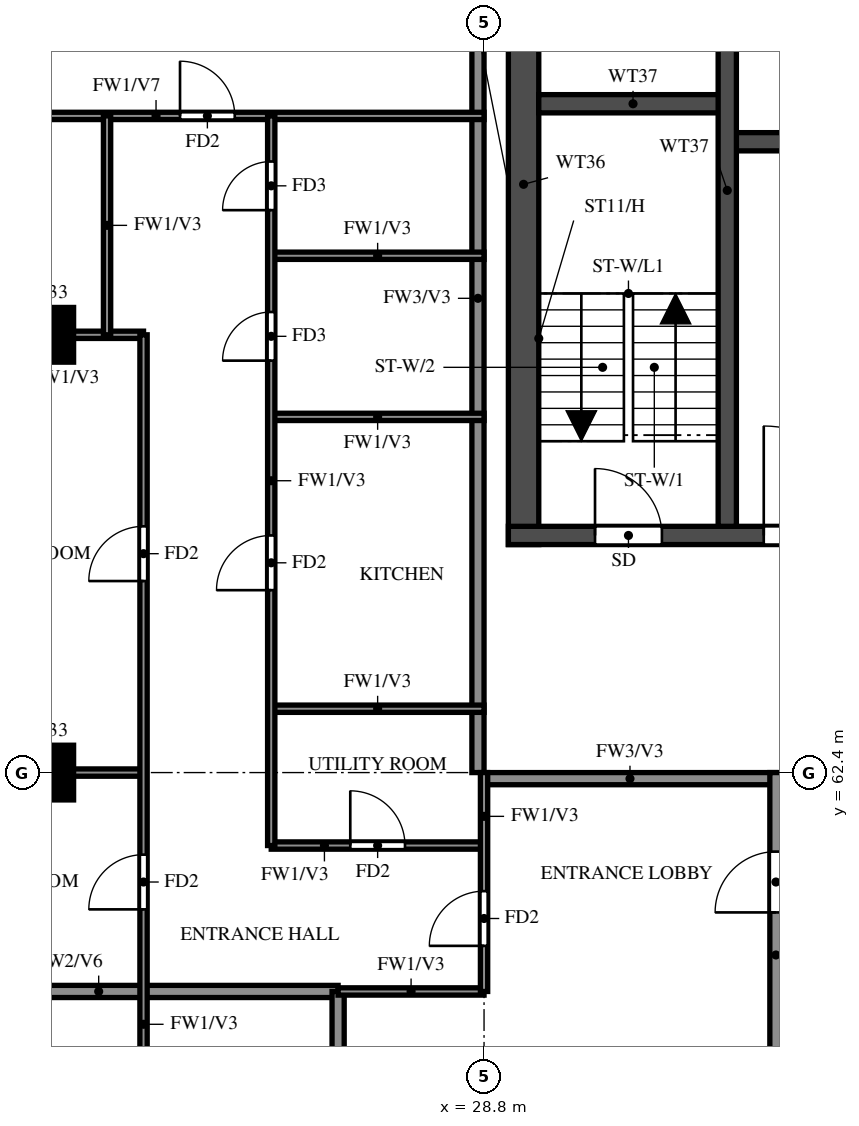
"""IFC4 building model, lengths in metres.
Left out: names, types, materials, properties, quantities, classifications, styles, units other than length and angle.
Written with IfcOpenShell. Run it as: python <this file> out.ifc"""

import sys

from ifc_helpers import new_model, si_unit, direction, frame, frame_2d, origin, origin_2d, place, context, subcontext, project, spatial, rectangle, extrude, source, transform, mapped, element, fill, save


model = new_model("IFC4")
c1 = context("Model", 3, precision=1e-05, world=origin(), true_north=direction((0.0, 1.0)))
c2 = subcontext(c1, "Body", "Model", "MODEL_VIEW")
j1 = project(units=[si_unit("LENGTHUNIT", "METRE"), si_unit("PLANEANGLEUNIT", "RADIAN")], contexts=[c1])
p1 = place(None, origin())
s1 = spatial("IfcSite", under=j1, at=p1, CompositionType="ELEMENT")
p2 = place(p1, origin())
s2 = spatial("IfcBuilding", under=s1, at=p2, CompositionType="ELEMENT")
p3 = place(p2, frame((0.0, 0.0, 215.0)))
s3 = spatial("IfcBuildingStorey", under=s2, at=p3, CompositionType="ELEMENT", Elevation=215.0)
m1 = source(origin(), c2, "Body", "SweptSolid", [
    extrude(rectangle(XDim=0.9, YDim=0.9, at=origin_2d()), origin(), (0.0, 0.0, 1.0), 3.22),
])
for number, where, z_axis, x_axis in (
    (1, (21.6, 62.4, 0.0), (0.0, 0.0, 1.0), (1.0, 0.0, 0.0)),
    (2, (21.6, 69.6, 0.0), (0.0, 0.0, 1.0), (1.0, 0.0, 0.0)),
):
    element("IfcColumn", number, at=place(p3, frame(where, z_axis=z_axis, x_axis=x_axis)), inside=s3, PredefinedType="COLUMN", context=c2, shape_type="MappedRepresentation", body=[
        mapped(m1, transform((0.0, 0.0, 0.0))),
    ])
p4 = place(p3, frame((29.45, 66.15, 0.0), z_axis=(0.0, 0.0, 1.0), x_axis=(0.0, 1.0, 0.0)))
e3 = element("IfcWall", 3, at=p4, inside=s3, PredefinedType="SHEAR", context=c2, shape_type="SweptSolid", body=[
    extrude(rectangle(XDim=11.85, YDim=0.5, at=frame_2d((5.925, 0.0))), origin(), (0.0, 0.0, 1.0), 3.22),
])
p5 = place(p3, frame((29.2, 66.3, 0.0), z_axis=(0.0, 0.0, 1.0), x_axis=(1.0, 0.0, 0.0)))
e4 = element("IfcWall", 4, at=p5, inside=s3, PredefinedType="SHEAR", context=c2, shape_type="SweptSolid", body=[
    extrude(rectangle(XDim=42.4, YDim=0.3, at=frame_2d((21.2, 0.0))), origin(), (0.0, 0.0, 1.0), 3.22),
])
p6 = place(p5, frame((1.425, 0.0, 0.0)))
e5 = element("IfcOpeningElement", 5, at=p6, cuts=e4, PredefinedType="OPENING", context=c2, shape_type="SweptSolid", body=[
    extrude(rectangle(XDim=1.1, YDim=2.1, at=frame_2d((0.55, 1.05))), frame((0.0, 0.16, 0.0), z_axis=(0.0, -1.0, 0.0), x_axis=(1.0, 0.0, 0.0)), (0.0, 0.0, 1.0), 0.32),
])
p7 = place(p5, frame((4.2, 0.0, 0.0)))
e6 = element("IfcOpeningElement", 6, at=p7, cuts=e4, PredefinedType="OPENING", context=c2, shape_type="SweptSolid", body=[
    extrude(rectangle(XDim=1.8, YDim=2.1, at=frame_2d((0.9, 1.05))), frame((0.0, 0.16, 0.0), z_axis=(0.0, -1.0, 0.0), x_axis=(1.0, 0.0, 0.0)), (0.0, 0.0, 1.0), 0.32),
])
p8 = place(p3, frame((32.8, 72.775, 0.0), z_axis=(0.0, 0.0, 1.0), x_axis=(1.0, 0.0, 0.0)))
e7 = element("IfcWall", 7, at=p8, inside=s3, PredefinedType="SHEAR", context=c2, shape_type="SweptSolid", body=[
    extrude(rectangle(XDim=35.2, YDim=0.3, at=frame_2d((17.6, 0.0))), origin(), (0.0, 0.0, 1.0), 3.22),
])
p9 = place(p8, frame((19.8, 0.0, 0.0)))
e8 = element("IfcOpeningElement", 8, at=p9, cuts=e7, PredefinedType="OPENING", context=c2, shape_type="SweptSolid", body=[
    extrude(rectangle(XDim=1.1, YDim=2.1, at=frame_2d((0.55, 1.05))), frame((0.0, 0.16, 0.0), z_axis=(0.0, -1.0, 0.0), x_axis=(1.0, 0.0, 0.0)), (0.0, 0.0, 1.0), 0.32),
])
p10 = place(p8, frame((27.725, 0.0, 0.0)))
e9 = element("IfcOpeningElement", 9, at=p10, cuts=e7, PredefinedType="OPENING", context=c2, shape_type="SweptSolid", body=[
    extrude(rectangle(XDim=1.1, YDim=2.1, at=frame_2d((0.55, 1.05))), frame((0.0, 0.16, 0.0), z_axis=(0.0, -1.0, 0.0), x_axis=(1.0, 0.0, 0.0)), (0.0, 0.0, 1.0), 0.32),
])
p11 = place(p8, frame((30.325, 0.0, 0.0)))
e10 = element("IfcOpeningElement", 10, at=p11, cuts=e7, PredefinedType="OPENING", context=c2, shape_type="SweptSolid", body=[
    extrude(rectangle(XDim=1.1, YDim=2.1, at=frame_2d((0.55, 1.05))), frame((0.0, 0.16, 0.0), z_axis=(0.0, -1.0, 0.0), x_axis=(1.0, 0.0, 0.0)), (0.0, 0.0, 1.0), 0.32),
])
p12 = place(p8, frame((3.825, 0.0, 0.0)))
e11 = element("IfcOpeningElement", 11, at=p12, cuts=e7, PredefinedType="OPENING", context=c2, shape_type="SweptSolid", body=[
    extrude(rectangle(XDim=1.1, YDim=2.1, at=frame_2d((0.55, 1.05))), frame((0.0, 0.16, 0.0), z_axis=(0.0, -1.0, 0.0), x_axis=(1.0, 0.0, 0.0)), (0.0, 0.0, 1.0), 0.32),
])
p13 = place(p8, frame((6.575, 0.0, 0.0)))
e12 = element("IfcOpeningElement", 12, at=p13, cuts=e7, PredefinedType="OPENING", context=c2, shape_type="SweptSolid", body=[
    extrude(rectangle(XDim=1.1, YDim=2.1, at=frame_2d((0.55, 1.05))), frame((0.0, 0.16, 0.0), z_axis=(0.0, -1.0, 0.0), x_axis=(1.0, 0.0, 0.0)), (0.0, 0.0, 1.0), 0.32),
])
p14 = place(p8, frame((9.325, 0.0, 0.0)))
e13 = element("IfcOpeningElement", 13, at=p14, cuts=e7, PredefinedType="OPENING", context=c2, shape_type="SweptSolid", body=[
    extrude(rectangle(XDim=1.1, YDim=2.1, at=frame_2d((0.55, 1.05))), frame((0.0, 0.16, 0.0), z_axis=(0.0, -1.0, 0.0), x_axis=(1.0, 0.0, 0.0)), (0.0, 0.0, 1.0), 0.32),
])
p15 = place(p8, frame((12.075, 0.0, 0.0)))
e14 = element("IfcOpeningElement", 14, at=p15, cuts=e7, PredefinedType="OPENING", context=c2, shape_type="SweptSolid", body=[
    extrude(rectangle(XDim=1.1, YDim=2.1, at=frame_2d((0.55, 1.05))), frame((0.0, 0.16, 0.0), z_axis=(0.0, -1.0, 0.0), x_axis=(1.0, 0.0, 0.0)), (0.0, 0.0, 1.0), 0.32),
])
p16 = place(p8, frame((14.825, 0.0, 0.0)))
e15 = element("IfcOpeningElement", 15, at=p16, cuts=e7, PredefinedType="OPENING", context=c2, shape_type="SweptSolid", body=[
    extrude(rectangle(XDim=1.1, YDim=2.1, at=frame_2d((0.55, 1.05))), frame((0.0, 0.16, 0.0), z_axis=(0.0, -1.0, 0.0), x_axis=(1.0, 0.0, 0.0)), (0.0, 0.0, 1.0), 0.32),
])
p17 = place(p8, frame((17.575, 0.0, 0.0)))
e16 = element("IfcOpeningElement", 16, at=p17, cuts=e7, PredefinedType="OPENING", context=c2, shape_type="SweptSolid", body=[
    extrude(rectangle(XDim=1.1, YDim=2.1, at=frame_2d((0.55, 1.05))), frame((0.0, 0.16, 0.0), z_axis=(0.0, -1.0, 0.0), x_axis=(1.0, 0.0, 0.0)), (0.0, 0.0, 1.0), 0.32),
])
p18 = place(p8, frame((0.95, 0.0, 0.0)))
e17 = element("IfcOpeningElement", 17, at=p18, cuts=e7, PredefinedType="OPENING", context=c2, shape_type="SweptSolid", body=[
    extrude(rectangle(XDim=1.1, YDim=2.1, at=frame_2d((0.55, 1.05))), frame((0.0, 0.16, 0.0), z_axis=(0.0, -1.0, 0.0), x_axis=(1.0, 0.0, 0.0)), (0.0, 0.0, 1.0), 0.32),
])
p19 = place(p3, frame((29.7, 73.4, 0.0), z_axis=(0.0, 0.0, 1.0), x_axis=(1.0, 0.0, 0.0)))
e18 = element("IfcWall", 18, at=p19, inside=s3, PredefinedType="SHEAR", context=c2, shape_type="SweptSolid", body=[
    extrude(rectangle(XDim=3.1, YDim=0.3, at=frame_2d((1.55, 0.0))), origin(), (0.0, 0.0, 1.0), 3.22),
])
p20 = place(p3, frame((32.8, 66.45, 0.0), z_axis=(0.0, 0.0, 1.0), x_axis=(0.0, 1.0, 0.0)))
e19 = element("IfcWall", 19, at=p20, inside=s3, PredefinedType="SHEAR", context=c2, shape_type="SweptSolid", body=[
    extrude(rectangle(XDim=11.05, YDim=0.3, at=frame_2d((5.525, 0.0))), origin(), (0.0, 0.0, 1.0), 3.22),
])
p21 = place(p3, frame((28.8, 62.3, 0.0), z_axis=(0.0, 0.0, 1.0), x_axis=(1.0, 0.0, 0.0)))
e20 = element("IfcWall", 20, at=p21, inside=s3, PredefinedType="SOLIDWALL", context=c2, shape_type="SweptSolid", body=[
    extrude(rectangle(XDim=4.8, YDim=0.2, at=frame_2d((2.4, 0.0))), origin(), (0.0, 0.0, 1.0), 3.22),
])
p22 = place(p3, frame((28.7, 62.4, 0.0), z_axis=(0.0, 0.0, 1.0), x_axis=(0.0, 1.0, 0.0)))
e21 = element("IfcWall", 21, at=p22, inside=s3, PredefinedType="SOLIDWALL", context=c2, shape_type="SweptSolid", body=[
    extrude(rectangle(XDim=15.6, YDim=0.2, at=frame_2d((7.8, 0.0))), origin(), (0.0, 0.0, 1.0), 3.22),
])
p23 = place(p3, frame((33.6, 56.4, 0.0), z_axis=(0.0, 0.0, 1.0), x_axis=(0.0, 1.0, 0.0)))
e22 = element("IfcWall", 22, at=p23, inside=s3, PredefinedType="SOLIDWALL", context=c2, shape_type="SweptSolid", body=[
    extrude(rectangle(XDim=6.0, YDim=0.2, at=frame_2d((3.0, 0.0))), origin(), (0.0, 0.0, 1.0), 3.22),
])
p24 = place(p23, frame((3.7, 0.0, 0.0)))
e23 = element("IfcOpeningElement", 23, at=p24, cuts=e22, PredefinedType="OPENING", context=c2, shape_type="SweptSolid", body=[
    extrude(rectangle(XDim=1.0, YDim=2.1, at=frame_2d((0.5, 1.05))), frame((0.0, 0.11, 0.0), z_axis=(0.0, -1.0, 0.0), x_axis=(1.0, 0.0, 0.0)), (0.0, 0.0, 1.0), 0.22),
])
p25 = place(p3, frame((18.525, 58.8, 0.0), z_axis=(0.0, 0.0, 1.0), x_axis=(1.0, 0.0, 0.0)))
e24 = element("IfcWall", 24, at=p25, inside=s3, PredefinedType="SOLIDWALL", context=c2, shape_type="SweptSolid", body=[
    extrude(rectangle(XDim=7.875, YDim=0.2, at=frame_2d((3.938, 0.0))), origin(), (0.0, 0.0, 1.0), 2.32),
])
p26 = place(p3, frame((26.4, 56.4, 0.0), z_axis=(0.0, 0.0, 1.0), x_axis=(0.0, 1.0, 0.0)))
e25 = element("IfcWall", 25, at=p26, inside=s3, PredefinedType="SOLIDWALL", context=c2, shape_type="SweptSolid", body=[
    extrude(rectangle(XDim=2.4, YDim=0.2, at=frame_2d((1.2, 0.0))), origin(), (0.0, 0.0, 1.0), 3.22),
])
p27 = place(p3, frame((26.4, 58.8, 0.0), z_axis=(0.0, 0.0, 1.0), x_axis=(1.0, 0.0, 0.0)))
e26 = element("IfcWall", 26, at=p27, inside=s3, PredefinedType="PARTITIONING", context=c2, shape_type="SweptSolid", body=[
    extrude(rectangle(XDim=2.4, YDim=0.12, at=frame_2d((1.2, 0.0))), origin(), (0.0, 0.0, 1.0), 3.22),
])
p28 = place(p3, frame((25.3, 61.2, 0.0), z_axis=(0.0, 0.0, 1.0), x_axis=(1.0, 0.0, 0.0)))
e27 = element("IfcWall", 27, at=p28, inside=s3, PredefinedType="PARTITIONING", context=c2, shape_type="SweptSolid", body=[
    extrude(rectangle(XDim=3.5, YDim=0.12, at=frame_2d((1.75, 0.0))), origin(), (0.0, 0.0, 1.0), 3.22),
])
p29 = place(p28, frame((1.3, 0.0, 0.0)))
e28 = element("IfcOpeningElement", 28, at=p29, cuts=e27, PredefinedType="OPENING", context=c2, shape_type="SweptSolid", body=[
    extrude(rectangle(XDim=0.9, YDim=2.1, at=frame_2d((0.45, 1.05))), frame((0.0, 0.07, 0.0), z_axis=(0.0, -1.0, 0.0), x_axis=(1.0, 0.0, 0.0)), (0.0, 0.0, 1.0), 0.14),
])
p30 = place(p3, frame((18.525, 62.4, 0.0), z_axis=(0.0, 0.0, 1.0), x_axis=(1.0, 0.0, 0.0)))
e29 = element("IfcWall", 29, at=p30, inside=s3, PredefinedType="PARTITIONING", context=c2, shape_type="SweptSolid", body=[
    extrude(rectangle(XDim=4.675, YDim=0.12, at=frame_2d((2.337, 0.0))), origin(), (0.0, 0.0, 1.0), 3.22),
])
for number, where, z_axis, x_axis in (
    (30, (25.3, 63.45, 0.0), (0.0, 0.0, 1.0), (1.0, 0.0, 0.0)),
    (31, (25.3, 68.25, 0.0), (0.0, 0.0, 1.0), (1.0, 0.0, 0.0)),
):
    element("IfcWall", number, at=place(p3, frame(where, z_axis=z_axis, x_axis=x_axis)), inside=s3, PredefinedType="PARTITIONING", context=c2, shape_type="SweptSolid", body=[
        extrude(rectangle(XDim=3.5, YDim=0.12, at=frame_2d((1.75, 0.0))), origin(), (0.0, 0.0, 1.0), 3.22),
    ])
p31 = place(p3, frame((18.525, 69.6, 0.0), z_axis=(0.0, 0.0, 1.0), x_axis=(1.0, 0.0, 0.0)))
e32 = element("IfcWall", 32, at=p31, inside=s3, PredefinedType="PARTITIONING", context=c2, shape_type="SweptSolid", body=[
    extrude(rectangle(XDim=4.675, YDim=0.12, at=frame_2d((2.337, 0.0))), origin(), (0.0, 0.0, 1.0), 3.22),
])
p32 = place(p31, frame((1.538, 0.0, 0.0)))
e33 = element("IfcOpeningElement", 33, at=p32, cuts=e32, PredefinedType="OPENING", context=c2, shape_type="SweptSolid", body=[
    extrude(rectangle(XDim=0.8, YDim=2.1, at=frame_2d((0.4, 1.05))), frame((0.0, 0.07, 0.0), z_axis=(0.0, -1.0, 0.0), x_axis=(1.0, 0.0, 0.0)), (0.0, 0.0, 1.0), 0.14),
])
p33 = place(p3, frame((25.3, 70.9, 0.0), z_axis=(0.0, 0.0, 1.0), x_axis=(1.0, 0.0, 0.0)))
e34 = element("IfcWall", 34, at=p33, inside=s3, PredefinedType="PARTITIONING", context=c2, shape_type="SweptSolid", body=[
    extrude(rectangle(XDim=3.5, YDim=0.12, at=frame_2d((1.75, 0.0))), origin(), (0.0, 0.0, 1.0), 3.22),
])
p34 = place(p3, frame((18.525, 73.2, 0.0), z_axis=(0.0, 0.0, 1.0), x_axis=(1.0, 0.0, 0.0)))
e35 = element("IfcWall", 35, at=p34, inside=s3, PredefinedType="PARTITIONING", context=c2, shape_type="SweptSolid", body=[
    extrude(rectangle(XDim=10.275, YDim=0.12, at=frame_2d((5.138, 0.0))), origin(), (0.0, 0.0, 1.0), 2.32),
])
p35 = place(p34, frame((5.275, 0.0, 0.0)))
e36 = element("IfcOpeningElement", 36, at=p35, cuts=e35, PredefinedType="OPENING", context=c2, shape_type="SweptSolid", body=[
    extrude(rectangle(XDim=0.9, YDim=2.1, at=frame_2d((0.45, 1.05))), frame((0.0, 0.07, 0.0), z_axis=(0.0, -1.0, 0.0), x_axis=(1.0, 0.0, 0.0)), (0.0, 0.0, 1.0), 0.14),
])
p36 = place(p3, frame((22.6, 69.6, 0.0), z_axis=(0.0, 0.0, 1.0), x_axis=(0.0, 1.0, 0.0)))
e37 = element("IfcWall", 37, at=p36, inside=s3, PredefinedType="PARTITIONING", context=c2, shape_type="SweptSolid", body=[
    extrude(rectangle(XDim=3.6, YDim=0.12, at=frame_2d((1.8, 0.0))), origin(), (0.0, 0.0, 1.0), 3.22),
])
p37 = place(p3, frame((23.2, 48.0, 0.0), z_axis=(0.0, 0.0, 1.0), x_axis=(0.0, 1.0, 0.0)))
e38 = element("IfcWall", 38, at=p37, inside=s3, PredefinedType="PARTITIONING", context=c2, shape_type="SweptSolid", body=[
    extrude(rectangle(XDim=21.6, YDim=0.12, at=frame_2d((10.8, 0.0))), origin(), (0.0, 0.0, 1.0), 3.22),
])
p38 = place(p37, frame((1.35, 0.0, 0.0)))
e39 = element("IfcOpeningElement", 39, at=p38, cuts=e38, PredefinedType="OPENING", context=c2, shape_type="SweptSolid", body=[
    extrude(rectangle(XDim=0.9, YDim=2.1, at=frame_2d((0.45, 1.05))), frame((0.0, 0.07, 0.0), z_axis=(0.0, -1.0, 0.0), x_axis=(1.0, 0.0, 0.0)), (0.0, 0.0, 1.0), 0.14),
])
p39 = place(p37, frame((4.95, 0.0, 0.0)))
e40 = element("IfcOpeningElement", 40, at=p39, cuts=e38, PredefinedType="OPENING", context=c2, shape_type="SweptSolid", body=[
    extrude(rectangle(XDim=0.9, YDim=2.1, at=frame_2d((0.45, 1.05))), frame((0.0, 0.07, 0.0), z_axis=(0.0, -1.0, 0.0), x_axis=(1.0, 0.0, 0.0)), (0.0, 0.0, 1.0), 0.14),
])
p40 = place(p37, frame((8.25, 0.0, 0.0)))
e41 = element("IfcOpeningElement", 41, at=p40, cuts=e38, PredefinedType="OPENING", context=c2, shape_type="SweptSolid", body=[
    extrude(rectangle(XDim=1.5, YDim=2.1, at=frame_2d((0.75, 1.05))), frame((0.0, 0.07, 0.0), z_axis=(0.0, -1.0, 0.0), x_axis=(1.0, 0.0, 0.0)), (0.0, 0.0, 1.0), 0.14),
])
p41 = place(p37, frame((12.15, 0.0, 0.0)))
e42 = element("IfcOpeningElement", 42, at=p41, cuts=e38, PredefinedType="OPENING", context=c2, shape_type="SweptSolid", body=[
    extrude(rectangle(XDim=0.9, YDim=2.1, at=frame_2d((0.45, 1.05))), frame((0.0, 0.07, 0.0), z_axis=(0.0, -1.0, 0.0), x_axis=(1.0, 0.0, 0.0)), (0.0, 0.0, 1.0), 0.14),
])
p42 = place(p37, frame((17.55, 0.0, 0.0)))
e43 = element("IfcOpeningElement", 43, at=p42, cuts=e38, PredefinedType="OPENING", context=c2, shape_type="SweptSolid", body=[
    extrude(rectangle(XDim=0.9, YDim=2.1, at=frame_2d((0.45, 1.05))), frame((0.0, 0.07, 0.0), z_axis=(0.0, -1.0, 0.0), x_axis=(1.0, 0.0, 0.0)), (0.0, 0.0, 1.0), 0.14),
])
p43 = place(p3, frame((25.3, 61.2, 0.0), z_axis=(0.0, 0.0, 1.0), x_axis=(0.0, 1.0, 0.0)))
e44 = element("IfcWall", 44, at=p43, inside=s3, PredefinedType="PARTITIONING", context=c2, shape_type="SweptSolid", body=[
    extrude(rectangle(XDim=12.0, YDim=0.12, at=frame_2d((6.0, 0.0))), origin(), (0.0, 0.0, 1.0), 3.22),
])
p44 = place(p43, frame((4.2, 0.0, 0.0)))
e45 = element("IfcOpeningElement", 45, at=p44, cuts=e44, PredefinedType="OPENING", context=c2, shape_type="SweptSolid", body=[
    extrude(rectangle(XDim=0.9, YDim=2.1, at=frame_2d((0.45, 1.05))), frame((0.0, 0.07, 0.0), z_axis=(0.0, -1.0, 0.0), x_axis=(1.0, 0.0, 0.0)), (0.0, 0.0, 1.0), 0.14),
])
p45 = place(p43, frame((7.975, 0.0, 0.0)))
e46 = element("IfcOpeningElement", 46, at=p45, cuts=e44, PredefinedType="OPENING", context=c2, shape_type="SweptSolid", body=[
    extrude(rectangle(XDim=0.8, YDim=2.1, at=frame_2d((0.4, 1.05))), frame((0.0, 0.07, 0.0), z_axis=(0.0, -1.0, 0.0), x_axis=(1.0, 0.0, 0.0)), (0.0, 0.0, 1.0), 0.14),
])
p46 = place(p43, frame((10.45, 0.0, 0.0)))
e47 = element("IfcOpeningElement", 47, at=p46, cuts=e44, PredefinedType="OPENING", context=c2, shape_type="SweptSolid", body=[
    extrude(rectangle(XDim=0.8, YDim=2.1, at=frame_2d((0.4, 1.05))), frame((0.0, 0.07, 0.0), z_axis=(0.0, -1.0, 0.0), x_axis=(1.0, 0.0, 0.0)), (0.0, 0.0, 1.0), 0.14),
])
p47 = place(p3, frame((28.8, 58.8, 0.0), z_axis=(0.0, 0.0, 1.0), x_axis=(0.0, 1.0, 0.0)))
e48 = element("IfcWall", 48, at=p47, inside=s3, PredefinedType="PARTITIONING", context=c2, shape_type="SweptSolid", body=[
    extrude(rectangle(XDim=3.6, YDim=0.12, at=frame_2d((1.8, 0.0))), origin(), (0.0, 0.0, 1.0), 3.22),
])
p48 = place(p47, frame((0.75, 0.0, 0.0)))
e49 = element("IfcOpeningElement", 49, at=p48, cuts=e48, PredefinedType="OPENING", context=c2, shape_type="SweptSolid", body=[
    extrude(rectangle(XDim=0.9, YDim=2.1, at=frame_2d((0.45, 1.05))), frame((0.0, 0.07, 0.0), z_axis=(0.0, -1.0, 0.0), x_axis=(1.0, 0.0, 0.0)), (0.0, 0.0, 1.0), 0.14),
])
p49 = place(p6, origin())
e50 = element("IfcDoor", 50, at=p49, inside=s3, OperationType="SINGLE_SWING_LEFT", PredefinedType="DOOR", context=c2, shape_type="SweptSolid", body=[
    extrude(rectangle(XDim=1.1, YDim=2.1, at=frame_2d((0.55, 1.05))), frame((0.0, 0.025, 0.0), z_axis=(0.0, -1.0, 0.0), x_axis=(1.0, 0.0, 0.0)), (0.0, 0.0, 1.0), 0.05),
])
fill(e5, e50)
p50 = place(p7, origin())
e51 = element("IfcDoor", 51, at=p50, inside=s3, OperationType="DOUBLE_DOOR_SINGLE_SWING", PredefinedType="DOOR", context=c2, shape_type="SweptSolid", body=[
    extrude(rectangle(XDim=1.8, YDim=2.1, at=frame_2d((0.9, 1.05))), frame((0.0, 0.025, 0.0), z_axis=(0.0, -1.0, 0.0), x_axis=(1.0, 0.0, 0.0)), (0.0, 0.0, 1.0), 0.05),
])
fill(e6, e51)
p51 = place(p48, origin())
e52 = element("IfcDoor", 52, at=p51, inside=s3, OperationType="SINGLE_SWING_LEFT", PredefinedType="DOOR", context=c2, shape_type="SweptSolid", body=[
    extrude(rectangle(XDim=0.9, YDim=2.1, at=frame_2d((0.45, 1.05))), frame((0.0, 0.025, 0.0), z_axis=(0.0, -1.0, 0.0), x_axis=(1.0, 0.0, 0.0)), (0.0, 0.0, 1.0), 0.05),
])
fill(e49, e52)
p52 = place(p24, origin())
e53 = element("IfcDoor", 53, at=p52, inside=s3, OperationType="SINGLE_SWING_LEFT", PredefinedType="DOOR", context=c2, shape_type="SweptSolid", body=[
    extrude(rectangle(XDim=1.0, YDim=2.1, at=frame_2d((0.5, 1.05))), frame((0.0, 0.025, 0.0), z_axis=(0.0, -1.0, 0.0), x_axis=(1.0, 0.0, 0.0)), (0.0, 0.0, 1.0), 0.05),
])
fill(e23, e53)
p53 = place(p41, origin())
e54 = element("IfcDoor", 54, at=p53, inside=s3, OperationType="SINGLE_SWING_RIGHT", PredefinedType="DOOR", context=c2, shape_type="SweptSolid", body=[
    extrude(rectangle(XDim=0.9, YDim=2.1, at=frame_2d((0.45, 1.05))), frame((0.0, 0.025, 0.0), z_axis=(0.0, -1.0, 0.0), x_axis=(1.0, 0.0, 0.0)), (0.0, 0.0, 1.0), 0.05),
])
fill(e42, e54)
p54 = place(p42, origin())
e55 = element("IfcDoor", 55, at=p54, inside=s3, OperationType="SINGLE_SWING_LEFT", PredefinedType="DOOR", context=c2, shape_type="SweptSolid", body=[
    extrude(rectangle(XDim=0.9, YDim=2.1, at=frame_2d((0.45, 1.05))), frame((0.0, 0.025, 0.0), z_axis=(0.0, -1.0, 0.0), x_axis=(1.0, 0.0, 0.0)), (0.0, 0.0, 1.0), 0.05),
])
fill(e43, e55)
p55 = place(p35, origin())
e56 = element("IfcDoor", 56, at=p55, inside=s3, OperationType="SINGLE_SWING_RIGHT", PredefinedType="DOOR", context=c2, shape_type="SweptSolid", body=[
    extrude(rectangle(XDim=0.9, YDim=2.1, at=frame_2d((0.45, 1.05))), frame((0.0, 0.025, 0.0), z_axis=(0.0, -1.0, 0.0), x_axis=(1.0, 0.0, 0.0)), (0.0, 0.0, 1.0), 0.05),
])
fill(e36, e56)
p56 = place(p29, origin())
e57 = element("IfcDoor", 57, at=p56, inside=s3, OperationType="SINGLE_SWING_LEFT", PredefinedType="DOOR", context=c2, shape_type="SweptSolid", body=[
    extrude(rectangle(XDim=0.9, YDim=2.1, at=frame_2d((0.45, 1.05))), frame((0.0, 0.025, 0.0), z_axis=(0.0, -1.0, 0.0), x_axis=(1.0, 0.0, 0.0)), (0.0, 0.0, 1.0), 0.05),
])
fill(e28, e57)
p57 = place(p44, origin())
e58 = element("IfcDoor", 58, at=p57, inside=s3, OperationType="SINGLE_SWING_LEFT", PredefinedType="DOOR", context=c2, shape_type="SweptSolid", body=[
    extrude(rectangle(XDim=0.9, YDim=2.1, at=frame_2d((0.45, 1.05))), frame((0.0, 0.025, 0.0), z_axis=(0.0, -1.0, 0.0), x_axis=(1.0, 0.0, 0.0)), (0.0, 0.0, 1.0), 0.05),
])
fill(e45, e58)
p58 = place(p45, origin())
e59 = element("IfcDoor", 59, at=p58, inside=s3, OperationType="SINGLE_SWING_RIGHT", PredefinedType="DOOR", context=c2, shape_type="SweptSolid", body=[
    extrude(rectangle(XDim=0.8, YDim=2.1, at=frame_2d((0.4, 1.05))), frame((0.0, 0.025, 0.0), z_axis=(0.0, -1.0, 0.0), x_axis=(1.0, 0.0, 0.0)), (0.0, 0.0, 1.0), 0.05),
])
fill(e46, e59)
p59 = place(p46, origin())
e60 = element("IfcDoor", 60, at=p59, inside=s3, OperationType="SINGLE_SWING_LEFT", PredefinedType="DOOR", context=c2, shape_type="SweptSolid", body=[
    extrude(rectangle(XDim=0.8, YDim=2.1, at=frame_2d((0.4, 1.05))), frame((0.0, 0.025, 0.0), z_axis=(0.0, -1.0, 0.0), x_axis=(1.0, 0.0, 0.0)), (0.0, 0.0, 1.0), 0.05),
])
fill(e47, e60)
save(model, sys.argv[1])
